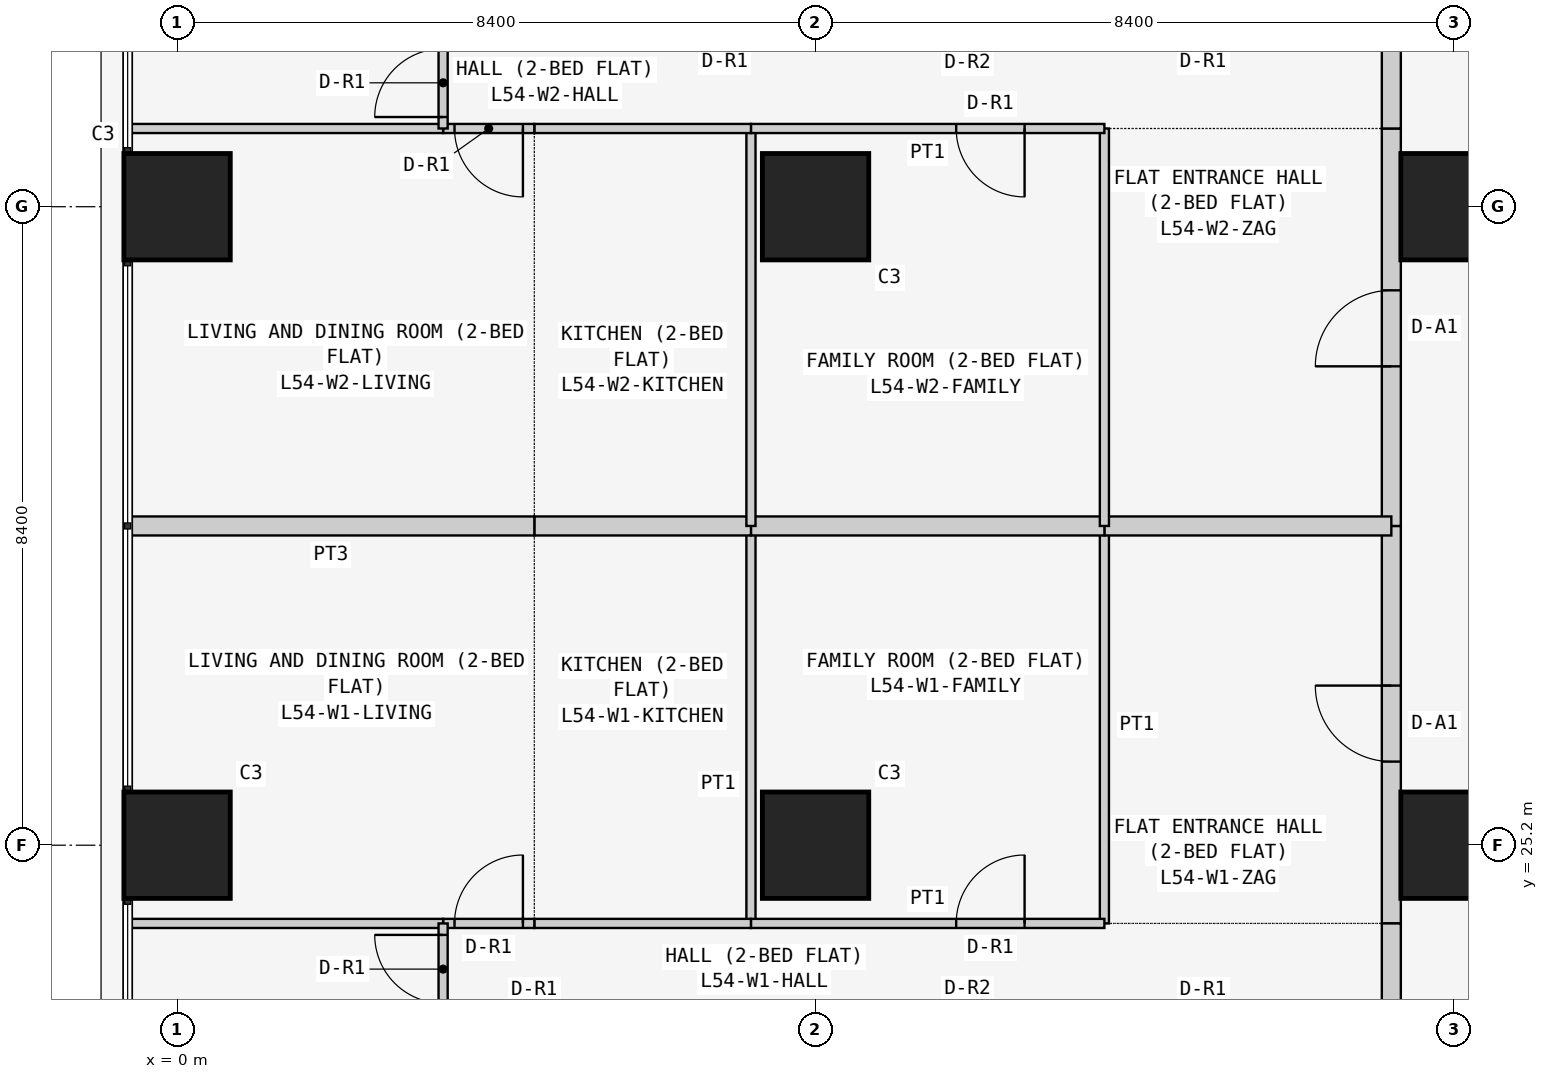
"""IFC4 building model, lengths in metres.
Left out: names, types, materials, properties, quantities, classifications, styles, units other than length and angle.
Written with IfcOpenShell. Run it as: python <this file> out.ifc"""

import sys

from ifc_helpers import new_model, si_unit, direction, frame, frame_2d, origin, origin_2d, place, context, subcontext, project, spatial, rectangle, extrude, element, fill, save


model = new_model("IFC4")
c1 = context("Model", 3, precision=1e-05, world=origin(), true_north=direction((0.0, 1.0)))
c2 = subcontext(c1, "Body", "Model", "MODEL_VIEW")
j1 = project(units=[si_unit("LENGTHUNIT", "METRE"), si_unit("PLANEANGLEUNIT", "RADIAN")], contexts=[c1])
p1 = place(None, origin())
s1 = spatial("IfcSite", under=j1, at=p1, CompositionType="ELEMENT")
p2 = place(p1, origin())
s2 = spatial("IfcBuilding", under=s1, at=p2, CompositionType="ELEMENT")
p3 = place(p2, frame((0.0, 0.0, 208.5)))
s3 = spatial("IfcBuildingStorey", under=s2, at=p3, CompositionType="ELEMENT", Elevation=208.5)
for number, where, z_axis, x_axis in (
    (1, (0.0, 25.2, 0.0), (0.0, 0.0, 1.0), (1.0, 0.0, 0.0)),
    (2, (0.0, 33.6, 0.0), (0.0, 0.0, 1.0), (1.0, 0.0, 0.0)),
    (3, (8.4, 25.2, 0.0), (0.0, 0.0, 1.0), (1.0, 0.0, 0.0)),
    (4, (8.4, 33.6, 0.0), (0.0, 0.0, 1.0), (1.0, 0.0, 0.0)),
    (5, (16.8, 25.2, 0.0), (0.0, 0.0, 1.0), (1.0, 0.0, 0.0)),
    (6, (16.8, 33.6, 0.0), (0.0, 0.0, 1.0), (1.0, 0.0, 0.0)),
):
    element("IfcColumn", number, at=place(p3, frame(where, z_axis=z_axis, x_axis=x_axis)), inside=s3, PredefinedType="COLUMN", context=c2, shape_type="SweptSolid", body=[
        extrude(rectangle(XDim=1.4, YDim=1.4, at=origin_2d()), origin(), (0.0, 0.0, 1.0), 3.6),
    ])
p4 = place(p3, frame((15.975, 24.171, 0.0), z_axis=(0.0, 0.0, 1.0), x_axis=(0.0, 1.0, 0.0)))
e7 = element("IfcWall", 7, at=p4, inside=s3, PredefinedType="PARTITIONING", context=c2, shape_type="SweptSolid", body=[
    extrude(rectangle(XDim=5.229, YDim=0.25, at=frame_2d((2.615, 0.0))), origin(), (0.0, 0.0, 1.0), 3.45),
])
p5 = place(p4, frame((2.129, 0.0, 0.0)))
e8 = element("IfcOpeningElement", 8, at=p5, cuts=e7, PredefinedType="OPENING", context=c2, shape_type="SweptSolid", body=[
    extrude(rectangle(XDim=1.0, YDim=2.1, at=frame_2d((0.5, 1.05))), frame((0.0, 0.135, 0.0), z_axis=(0.0, -1.0, 0.0), x_axis=(1.0, 0.0, 0.0)), (0.0, 0.0, 1.0), 0.27),
])
p6 = place(p3, frame((15.975, 22.971, 0.0), z_axis=(0.0, 0.0, 1.0), x_axis=(0.0, 1.0, 0.0)))
e9 = element("IfcWall", 9, at=p6, inside=s3, PredefinedType="PARTITIONING", context=c2, shape_type="SweptSolid", body=[
    extrude(rectangle(XDim=1.2, YDim=0.25, at=frame_2d((0.6, 0.0))), origin(), (0.0, 0.0, 1.0), 3.45),
])
p7 = place(p3, frame((15.975, 29.4, 0.0), z_axis=(0.0, 0.0, 1.0), x_axis=(0.0, 1.0, 0.0)))
e10 = element("IfcWall", 10, at=p7, inside=s3, PredefinedType="PARTITIONING", context=c2, shape_type="SweptSolid", body=[
    extrude(rectangle(XDim=5.229, YDim=0.25, at=frame_2d((2.615, 0.0))), origin(), (0.0, 0.0, 1.0), 3.45),
])
p8 = place(p7, frame((2.1, 0.0, 0.0)))
e11 = element("IfcOpeningElement", 11, at=p8, cuts=e10, PredefinedType="OPENING", context=c2, shape_type="SweptSolid", body=[
    extrude(rectangle(XDim=1.0, YDim=2.1, at=frame_2d((0.5, 1.05))), frame((0.0, 0.135, 0.0), z_axis=(0.0, -1.0, 0.0), x_axis=(1.0, 0.0, 0.0)), (0.0, 0.0, 1.0), 0.27),
])
p9 = place(p3, frame((15.975, 34.629, 0.0), z_axis=(0.0, 0.0, 1.0), x_axis=(0.0, 1.0, 0.0)))
e12 = element("IfcWall", 12, at=p9, inside=s3, PredefinedType="PARTITIONING", context=c2, shape_type="SweptSolid", body=[
    extrude(rectangle(XDim=1.2, YDim=0.25, at=frame_2d((0.6, 0.0))), origin(), (0.0, 0.0, 1.0), 3.45),
])
p10 = place(p3, frame((12.2, 29.4, 0.0), z_axis=(0.0, 0.0, 1.0), x_axis=(0.0, -1.0, 0.0)))
e13 = element("IfcWall", 13, at=p10, inside=s3, PredefinedType="PARTITIONING", context=c2, shape_type="SweptSolid", body=[
    extrude(rectangle(XDim=5.229, YDim=0.12, at=frame_2d((2.615, 0.0))), origin(), (0.0, 0.0, 1.0), 3.45),
])
p11 = place(p3, frame((15.975, 29.4, 0.0), z_axis=(0.0, 0.0, 1.0), x_axis=(-1.0, 0.0, 0.0)))
e14 = element("IfcWall", 14, at=p11, inside=s3, PredefinedType="PARTITIONING", context=c2, shape_type="SweptSolid", body=[
    extrude(rectangle(XDim=3.775, YDim=0.25, at=frame_2d((1.888, 0.0))), origin(), (0.0, 0.0, 1.0), 3.45),
])
p12 = place(p3, frame((7.55, 29.4, 0.0), z_axis=(0.0, 0.0, 1.0), x_axis=(0.0, -1.0, 0.0)))
e15 = element("IfcWall", 15, at=p12, inside=s3, PredefinedType="PARTITIONING", context=c2, shape_type="SweptSolid", body=[
    extrude(rectangle(XDim=5.229, YDim=0.12, at=frame_2d((2.615, 0.0))), origin(), (0.0, 0.0, 1.0), 3.45),
])
p13 = place(p3, frame((7.55, 24.171, 0.0), z_axis=(0.0, 0.0, 1.0), x_axis=(1.0, 0.0, 0.0)))
e16 = element("IfcWall", 16, at=p13, inside=s3, PredefinedType="PARTITIONING", context=c2, shape_type="SweptSolid", body=[
    extrude(rectangle(XDim=4.65, YDim=0.12, at=frame_2d((2.325, 0.0))), origin(), (0.0, 0.0, 1.0), 3.45),
])
p14 = place(p13, frame((2.7, 0.0, 0.0)))
e17 = element("IfcOpeningElement", 17, at=p14, cuts=e16, PredefinedType="OPENING", context=c2, shape_type="SweptSolid", body=[
    extrude(rectangle(XDim=0.9, YDim=2.1, at=frame_2d((0.45, 1.05))), frame((0.0, 0.07, 0.0), z_axis=(0.0, -1.0, 0.0), x_axis=(1.0, 0.0, 0.0)), (0.0, 0.0, 1.0), 0.14),
])
p15 = place(p3, frame((12.2, 29.4, 0.0), z_axis=(0.0, 0.0, 1.0), x_axis=(-1.0, 0.0, 0.0)))
e18 = element("IfcWall", 18, at=p15, inside=s3, PredefinedType="PARTITIONING", context=c2, shape_type="SweptSolid", body=[
    extrude(rectangle(XDim=4.65, YDim=0.25, at=frame_2d((2.325, 0.0))), origin(), (0.0, 0.0, 1.0), 3.45),
])
p16 = place(p3, frame((4.7, 24.171, 0.0), z_axis=(0.0, 0.0, 1.0), x_axis=(1.0, 0.0, 0.0)))
e19 = element("IfcWall", 19, at=p16, inside=s3, PredefinedType="PARTITIONING", context=c2, shape_type="SweptSolid", body=[
    extrude(rectangle(XDim=2.85, YDim=0.12, at=frame_2d((1.425, 0.0))), origin(), (0.0, 0.0, 1.0), 3.45),
])
p17 = place(p3, frame((7.55, 29.4, 0.0), z_axis=(0.0, 0.0, 1.0), x_axis=(-1.0, 0.0, 0.0)))
e20 = element("IfcWall", 20, at=p17, inside=s3, PredefinedType="PARTITIONING", context=c2, shape_type="SweptSolid", body=[
    extrude(rectangle(XDim=2.85, YDim=0.25, at=frame_2d((1.425, 0.0))), origin(), (0.0, 0.0, 1.0), 3.45),
])
p18 = place(p3, frame((3.5, 24.171, 0.0), z_axis=(0.0, 0.0, 1.0), x_axis=(1.0, 0.0, 0.0)))
e21 = element("IfcWall", 21, at=p18, inside=s3, PredefinedType="PARTITIONING", context=c2, shape_type="SweptSolid", body=[
    extrude(rectangle(XDim=1.2, YDim=0.12, at=frame_2d((0.6, 0.0))), origin(), (0.0, 0.0, 1.0), 3.45),
])
p19 = place(p18, frame((0.15, 0.0, 0.0)))
e22 = element("IfcOpeningElement", 22, at=p19, cuts=e21, PredefinedType="OPENING", context=c2, shape_type="SweptSolid", body=[
    extrude(rectangle(XDim=0.9, YDim=2.1, at=frame_2d((0.45, 1.05))), frame((0.0, 0.07, 0.0), z_axis=(0.0, -1.0, 0.0), x_axis=(1.0, 0.0, 0.0)), (0.0, 0.0, 1.0), 0.14),
])
p20 = place(p3, frame((-0.65, 24.171, 0.0), z_axis=(0.0, 0.0, 1.0), x_axis=(1.0, 0.0, 0.0)))
e23 = element("IfcWall", 23, at=p20, inside=s3, PredefinedType="PARTITIONING", context=c2, shape_type="SweptSolid", body=[
    extrude(rectangle(XDim=4.15, YDim=0.12, at=frame_2d((2.075, 0.0))), origin(), (0.0, 0.0, 1.0), 3.45),
])
p21 = place(p3, frame((4.7, 29.4, 0.0), z_axis=(0.0, 0.0, 1.0), x_axis=(-1.0, 0.0, 0.0)))
e24 = element("IfcWall", 24, at=p21, inside=s3, PredefinedType="PARTITIONING", context=c2, shape_type="SweptSolid", body=[
    extrude(rectangle(XDim=5.35, YDim=0.25, at=frame_2d((2.675, 0.0))), origin(), (0.0, 0.0, 1.0), 3.45),
])
p22 = place(p3, frame((3.5, 24.171, 0.0), z_axis=(0.0, 0.0, 1.0), x_axis=(0.0, -1.0, 0.0)))
e25 = element("IfcWall", 25, at=p22, inside=s3, PredefinedType="PARTITIONING", context=c2, shape_type="SweptSolid", body=[
    extrude(rectangle(XDim=1.2, YDim=0.12, at=frame_2d((0.6, 0.0))), origin(), (0.0, 0.0, 1.0), 3.45),
])
p23 = place(p22, frame((0.151, 0.0, 0.0)))
e26 = element("IfcOpeningElement", 26, at=p23, cuts=e25, PredefinedType="OPENING", context=c2, shape_type="SweptSolid", body=[
    extrude(rectangle(XDim=0.9, YDim=2.1, at=frame_2d((0.45, 1.05))), frame((0.0, 0.07, 0.0), z_axis=(0.0, -1.0, 0.0), x_axis=(1.0, 0.0, 0.0)), (0.0, 0.0, 1.0), 0.14),
])
for number, where, z_axis, x_axis in (
    (27, (12.2, 29.4, 0.0), (0.0, 0.0, 1.0), (0.0, 1.0, 0.0)),
    (28, (7.55, 29.4, 0.0), (0.0, 0.0, 1.0), (0.0, 1.0, 0.0)),
):
    element("IfcWall", number, at=place(p3, frame(where, z_axis=z_axis, x_axis=x_axis)), inside=s3, PredefinedType="PARTITIONING", context=c2, shape_type="SweptSolid", body=[
        extrude(rectangle(XDim=5.229, YDim=0.12, at=frame_2d((2.615, 0.0))), origin(), (0.0, 0.0, 1.0), 3.45),
    ])
p24 = place(p3, frame((7.55, 34.629, 0.0), z_axis=(0.0, 0.0, 1.0), x_axis=(1.0, 0.0, 0.0)))
e29 = element("IfcWall", 29, at=p24, inside=s3, PredefinedType="PARTITIONING", context=c2, shape_type="SweptSolid", body=[
    extrude(rectangle(XDim=4.65, YDim=0.12, at=frame_2d((2.325, 0.0))), origin(), (0.0, 0.0, 1.0), 3.45),
])
p25 = place(p24, frame((2.7, 0.0, 0.0)))
e30 = element("IfcOpeningElement", 30, at=p25, cuts=e29, PredefinedType="OPENING", context=c2, shape_type="SweptSolid", body=[
    extrude(rectangle(XDim=0.9, YDim=2.1, at=frame_2d((0.45, 1.05))), frame((0.0, 0.07, 0.0), z_axis=(0.0, -1.0, 0.0), x_axis=(1.0, 0.0, 0.0)), (0.0, 0.0, 1.0), 0.14),
])
p26 = place(p3, frame((4.7, 34.629, 0.0), z_axis=(0.0, 0.0, 1.0), x_axis=(1.0, 0.0, 0.0)))
e31 = element("IfcWall", 31, at=p26, inside=s3, PredefinedType="PARTITIONING", context=c2, shape_type="SweptSolid", body=[
    extrude(rectangle(XDim=2.85, YDim=0.12, at=frame_2d((1.425, 0.0))), origin(), (0.0, 0.0, 1.0), 3.45),
])
p27 = place(p3, frame((3.5, 34.629, 0.0), z_axis=(0.0, 0.0, 1.0), x_axis=(1.0, 0.0, 0.0)))
e32 = element("IfcWall", 32, at=p27, inside=s3, PredefinedType="PARTITIONING", context=c2, shape_type="SweptSolid", body=[
    extrude(rectangle(XDim=1.2, YDim=0.12, at=frame_2d((0.6, 0.0))), origin(), (0.0, 0.0, 1.0), 3.45),
])
p28 = place(p27, frame((0.15, 0.0, 0.0)))
e33 = element("IfcOpeningElement", 33, at=p28, cuts=e32, PredefinedType="OPENING", context=c2, shape_type="SweptSolid", body=[
    extrude(rectangle(XDim=0.9, YDim=2.1, at=frame_2d((0.45, 1.05))), frame((0.0, 0.07, 0.0), z_axis=(0.0, -1.0, 0.0), x_axis=(1.0, 0.0, 0.0)), (0.0, 0.0, 1.0), 0.14),
])
p29 = place(p3, frame((-0.65, 34.629, 0.0), z_axis=(0.0, 0.0, 1.0), x_axis=(1.0, 0.0, 0.0)))
e34 = element("IfcWall", 34, at=p29, inside=s3, PredefinedType="PARTITIONING", context=c2, shape_type="SweptSolid", body=[
    extrude(rectangle(XDim=4.15, YDim=0.12, at=frame_2d((2.075, 0.0))), origin(), (0.0, 0.0, 1.0), 3.45),
])
p30 = place(p3, frame((3.5, 34.629, 0.0), z_axis=(0.0, 0.0, 1.0), x_axis=(0.0, 1.0, 0.0)))
e35 = element("IfcWall", 35, at=p30, inside=s3, PredefinedType="PARTITIONING", context=c2, shape_type="SweptSolid", body=[
    extrude(rectangle(XDim=1.2, YDim=0.12, at=frame_2d((0.6, 0.0))), origin(), (0.0, 0.0, 1.0), 3.45),
])
p31 = place(p30, frame((0.151, 0.0, 0.0)))
e36 = element("IfcOpeningElement", 36, at=p31, cuts=e35, PredefinedType="OPENING", context=c2, shape_type="SweptSolid", body=[
    extrude(rectangle(XDim=0.9, YDim=2.1, at=frame_2d((0.45, 1.05))), frame((0.0, 0.07, 0.0), z_axis=(0.0, -1.0, 0.0), x_axis=(1.0, 0.0, 0.0)), (0.0, 0.0, 1.0), 0.14),
])
p32 = place(p5, origin())
e37 = element("IfcDoor", 37, at=p32, inside=s3, OperationType="SINGLE_SWING_RIGHT", PredefinedType="DOOR", context=c2, shape_type="SweptSolid", body=[
    extrude(rectangle(XDim=1.0, YDim=2.1, at=frame_2d((0.5, 1.05))), frame((0.0, 0.025, 0.0), z_axis=(0.0, -1.0, 0.0), x_axis=(1.0, 0.0, 0.0)), (0.0, 0.0, 1.0), 0.05),
])
fill(e8, e37)
p33 = place(p14, origin())
e38 = element("IfcDoor", 38, at=p33, inside=s3, OperationType="SINGLE_SWING_RIGHT", PredefinedType="DOOR", context=c2, shape_type="SweptSolid", body=[
    extrude(rectangle(XDim=0.9, YDim=2.1, at=frame_2d((0.45, 1.05))), frame((0.0, 0.025, 0.0), z_axis=(0.0, -1.0, 0.0), x_axis=(1.0, 0.0, 0.0)), (0.0, 0.0, 1.0), 0.05),
])
fill(e17, e38)
p34 = place(p19, origin())
e39 = element("IfcDoor", 39, at=p34, inside=s3, OperationType="SINGLE_SWING_RIGHT", PredefinedType="DOOR", context=c2, shape_type="SweptSolid", body=[
    extrude(rectangle(XDim=0.9, YDim=2.1, at=frame_2d((0.45, 1.05))), frame((0.0, 0.025, 0.0), z_axis=(0.0, -1.0, 0.0), x_axis=(1.0, 0.0, 0.0)), (0.0, 0.0, 1.0), 0.05),
])
fill(e22, e39)
p35 = place(p23, frame((0.9, 0.0, 0.0), z_axis=(0.0, 0.0, 1.0), x_axis=(-1.0, 0.0, 0.0)))
e40 = element("IfcDoor", 40, at=p35, inside=s3, OperationType="SINGLE_SWING_RIGHT", PredefinedType="DOOR", context=c2, shape_type="SweptSolid", body=[
    extrude(rectangle(XDim=0.9, YDim=2.1, at=frame_2d((0.45, 1.05))), frame((0.0, 0.025, 0.0), z_axis=(0.0, -1.0, 0.0), x_axis=(1.0, 0.0, 0.0)), (0.0, 0.0, 1.0), 0.05),
])
fill(e26, e40)
p36 = place(p8, origin())
e41 = element("IfcDoor", 41, at=p36, inside=s3, OperationType="SINGLE_SWING_LEFT", PredefinedType="DOOR", context=c2, shape_type="SweptSolid", body=[
    extrude(rectangle(XDim=1.0, YDim=2.1, at=frame_2d((0.5, 1.05))), frame((0.0, 0.025, 0.0), z_axis=(0.0, -1.0, 0.0), x_axis=(1.0, 0.0, 0.0)), (0.0, 0.0, 1.0), 0.05),
])
fill(e11, e41)
p37 = place(p25, frame((0.9, 0.0, 0.0), z_axis=(0.0, 0.0, 1.0), x_axis=(-1.0, 0.0, 0.0)))
e42 = element("IfcDoor", 42, at=p37, inside=s3, OperationType="SINGLE_SWING_LEFT", PredefinedType="DOOR", context=c2, shape_type="SweptSolid", body=[
    extrude(rectangle(XDim=0.9, YDim=2.1, at=frame_2d((0.45, 1.05))), frame((0.0, 0.025, 0.0), z_axis=(0.0, -1.0, 0.0), x_axis=(1.0, 0.0, 0.0)), (0.0, 0.0, 1.0), 0.05),
])
fill(e30, e42)
p38 = place(p28, frame((0.9, 0.0, 0.0), z_axis=(0.0, 0.0, 1.0), x_axis=(-1.0, 0.0, 0.0)))
e43 = element("IfcDoor", 43, at=p38, inside=s3, OperationType="SINGLE_SWING_LEFT", PredefinedType="DOOR", context=c2, shape_type="SweptSolid", body=[
    extrude(rectangle(XDim=0.9, YDim=2.1, at=frame_2d((0.45, 1.05))), frame((0.0, 0.025, 0.0), z_axis=(0.0, -1.0, 0.0), x_axis=(1.0, 0.0, 0.0)), (0.0, 0.0, 1.0), 0.05),
])
fill(e33, e43)
p39 = place(p31, origin())
e44 = element("IfcDoor", 44, at=p39, inside=s3, OperationType="SINGLE_SWING_LEFT", PredefinedType="DOOR", context=c2, shape_type="SweptSolid", body=[
    extrude(rectangle(XDim=0.9, YDim=2.1, at=frame_2d((0.45, 1.05))), frame((0.0, 0.025, 0.0), z_axis=(0.0, -1.0, 0.0), x_axis=(1.0, 0.0, 0.0)), (0.0, 0.0, 1.0), 0.05),
])
fill(e36, e44)
save(model, sys.argv[1])
